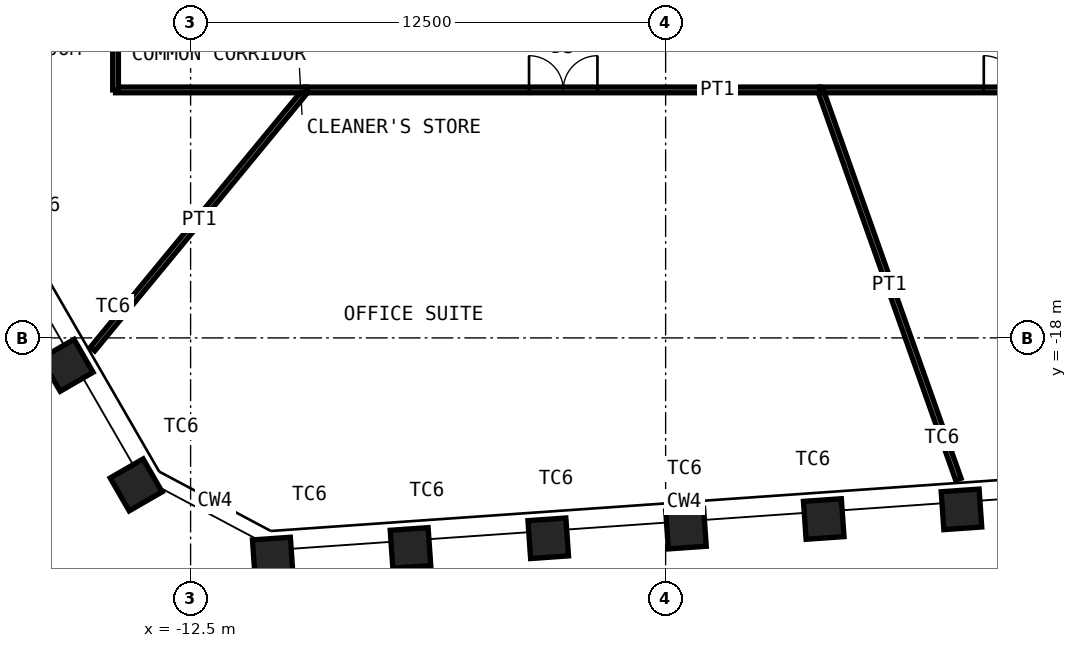
"""IFC4 building model, lengths in metres.
Left out: names, types, materials, properties, quantities, classifications, styles, units other than length and angle.
Written with IfcOpenShell. Run it as: python <this file> out.ifc"""

import sys

from ifc_helpers import new_model, si_unit, direction, frame, frame_2d, origin, origin_2d, place, context, subcontext, project, spatial, rectangle, hollow_rectangle, extrude, element, fill, save


model = new_model("IFC4")
c1 = context("Model", 3, precision=1e-05, world=origin(), true_north=direction((0.0, 1.0)))
c2 = subcontext(c1, "Body", "Model", "MODEL_VIEW")
j1 = project(units=[si_unit("LENGTHUNIT", "METRE"), si_unit("PLANEANGLEUNIT", "RADIAN")], contexts=[c1])
p1 = place(None, origin())
s1 = spatial("IfcSite", under=j1, at=p1, CompositionType="ELEMENT")
p2 = place(p1, origin())
s2 = spatial("IfcBuilding", under=s1, at=p2, CompositionType="ELEMENT")
p3 = place(p2, frame((0.0, 0.0, 247.6)))
s3 = spatial("IfcBuildingStorey", under=s2, at=p3, CompositionType="ELEMENT", Elevation=247.6)
for number, where, z_axis, x_axis in (
    (1, (7.785, -22.512, 0.0), (0.0, 0.0, 1.0), (0.998, 0.07, 0.0)),
    (2, (4.16, -22.765, 0.0), (0.0, 0.0, 1.0), (0.998, 0.07, 0.0)),
    (3, (0.536, -23.019, 0.0), (0.0, 0.0, 1.0), (0.998, 0.07, 0.0)),
    (4, (-3.089, -23.272, 0.0), (0.0, 0.0, 1.0), (0.998, 0.07, 0.0)),
    (5, (-6.714, -23.526, 0.0), (0.0, 0.0, 1.0), (0.998, 0.07, 0.0)),
    (6, (-10.338, -23.779, 0.0), (0.0, 0.0, 1.0), (0.998, 0.07, 0.0)),
    (7, (-13.933, -21.868, 0.0), (0.0, 0.0, 1.0), (0.5, -0.866, 0.0)),
    (8, (-15.749, -18.721, 0.0), (0.0, 0.0, 1.0), (0.5, -0.866, 0.0)),
):
    element("IfcColumn", number, at=place(p3, frame(where, z_axis=z_axis, x_axis=x_axis)), inside=s3, PredefinedType="COLUMN", context=c2, shape_type="SweptSolid", body=[
        extrude(hollow_rectangle(XDim=1.0, YDim=1.0, WallThickness=0.06, at=origin_2d()), origin(), (0.0, 0.0, 1.0), 4.2),
    ])
p4 = place(p3, frame((14.475, -11.475, 0.0), z_axis=(0.0, 0.0, 1.0), x_axis=(-1.0, 0.0, 0.0)))
e9 = element("IfcWall", 9, at=p4, inside=s3, PredefinedType="PARTITIONING", context=c2, shape_type="SweptSolid", body=[
    extrude(rectangle(XDim=10.406, YDim=0.15, at=frame_2d((5.203, 0.0))), origin(), (0.0, 0.0, 1.0), 4.03),
])
p5 = place(p4, frame((4.303, 0.0, 0.0)))
e10 = element("IfcOpeningElement", 10, at=p5, cuts=e9, PredefinedType="OPENING", context=c2, shape_type="SweptSolid", body=[
    extrude(rectangle(XDim=1.8, YDim=2.4, at=frame_2d((0.9, 1.2))), frame((0.0, 0.085, 0.0), z_axis=(0.0, -1.0, 0.0), x_axis=(1.0, 0.0, 0.0)), (0.0, 0.0, 1.0), 0.17),
])
p6 = place(p3, frame((7.703, -21.719, 0.0), z_axis=(0.0, 0.0, 1.0), x_axis=(-0.334269551553, 0.942477515331, 0.0)))
e11 = element("IfcWall", 11, at=p6, inside=s3, PredefinedType="PARTITIONING", context=c2, shape_type="SweptSolid", body=[
    extrude(rectangle(XDim=10.869, YDim=0.15, at=frame_2d((5.435, 0.0))), origin(), (0.0, 0.0, 1.0), 2.93),
])
p7 = place(p3, frame((4.07, -11.475, 0.0), z_axis=(0.0, 0.0, 1.0), x_axis=(-1.0, 0.0, 0.0)))
e12 = element("IfcWall", 12, at=p7, inside=s3, PredefinedType="PARTITIONING", context=c2, shape_type="SweptSolid", body=[
    extrude(rectangle(XDim=13.528, YDim=0.15, at=frame_2d((6.764, 0.0))), origin(), (0.0, 0.0, 1.0), 4.03),
])
p8 = place(p7, frame((5.864, 0.0, 0.0)))
e13 = element("IfcOpeningElement", 13, at=p8, cuts=e12, PredefinedType="OPENING", context=c2, shape_type="SweptSolid", body=[
    extrude(rectangle(XDim=1.8, YDim=2.4, at=frame_2d((0.9, 1.2))), frame((0.0, 0.085, 0.0), z_axis=(0.0, -1.0, 0.0), x_axis=(1.0, 0.0, 0.0)), (0.0, 0.0, 1.0), 0.17),
])
p9 = place(p3, frame((-15.08, -18.294, 0.0), z_axis=(0.0, 0.0, 1.0), x_axis=(0.636052894953, 0.771645459277, 0.0)))
e14 = element("IfcWall", 14, at=p9, inside=s3, PredefinedType="PARTITIONING", context=c2, shape_type="SweptSolid", body=[
    extrude(rectangle(XDim=8.837, YDim=0.15, at=frame_2d((4.418, 0.0))), origin(), (0.0, 0.0, 1.0), 2.93),
])
p10 = place(p3, frame((-9.459, -11.475, 0.0), z_axis=(0.0, 0.0, 1.0), x_axis=(-1.0, 0.0, 0.0)))
e15 = element("IfcWall", 15, at=p10, inside=s3, PredefinedType="PARTITIONING", context=c2, shape_type="SweptSolid", body=[
    extrude(rectangle(XDim=5.016, YDim=0.15, at=frame_2d((2.508, 0.0))), origin(), (0.0, 0.0, 1.0), 4.03),
])
p11 = place(p3, frame((-14.475, -11.475, 0.0), z_axis=(0.0, 0.0, 1.0), x_axis=(0.0, 1.0, 0.0)))
e16 = element("IfcWall", 16, at=p11, inside=s3, PredefinedType="PARTITIONING", context=c2, shape_type="SweptSolid", body=[
    extrude(rectangle(XDim=5.198, YDim=0.15, at=frame_2d((2.599, 0.0))), origin(), (0.0, 0.0, 1.0), 4.03),
])
p12 = place(p11, frame((1.699, 0.0, 0.0)))
e17 = element("IfcOpeningElement", 17, at=p12, cuts=e16, PredefinedType="OPENING", context=c2, shape_type="SweptSolid", body=[
    extrude(rectangle(XDim=1.8, YDim=2.4, at=frame_2d((0.9, 1.2))), frame((0.0, 0.085, 0.0), z_axis=(0.0, -1.0, 0.0), x_axis=(1.0, 0.0, 0.0)), (0.0, 0.0, 1.0), 0.17),
])
p13 = place(p5, origin())
e18 = element("IfcDoor", 18, at=p13, inside=s3, OperationType="DOUBLE_DOOR_DOUBLE_SWING", PredefinedType="DOOR", context=c2, shape_type="SweptSolid", body=[
    extrude(rectangle(XDim=1.8, YDim=2.4, at=frame_2d((0.9, 1.2))), frame((0.0, 0.025, 0.0), z_axis=(0.0, -1.0, 0.0), x_axis=(1.0, 0.0, 0.0)), (0.0, 0.0, 1.0), 0.05),
])
fill(e10, e18)
p14 = place(p8, origin())
e19 = element("IfcDoor", 19, at=p14, inside=s3, OperationType="DOUBLE_DOOR_DOUBLE_SWING", PredefinedType="DOOR", context=c2, shape_type="SweptSolid", body=[
    extrude(rectangle(XDim=1.8, YDim=2.4, at=frame_2d((0.9, 1.2))), frame((0.0, 0.025, 0.0), z_axis=(0.0, -1.0, 0.0), x_axis=(1.0, 0.0, 0.0)), (0.0, 0.0, 1.0), 0.05),
])
fill(e13, e19)
save(model, sys.argv[1])
